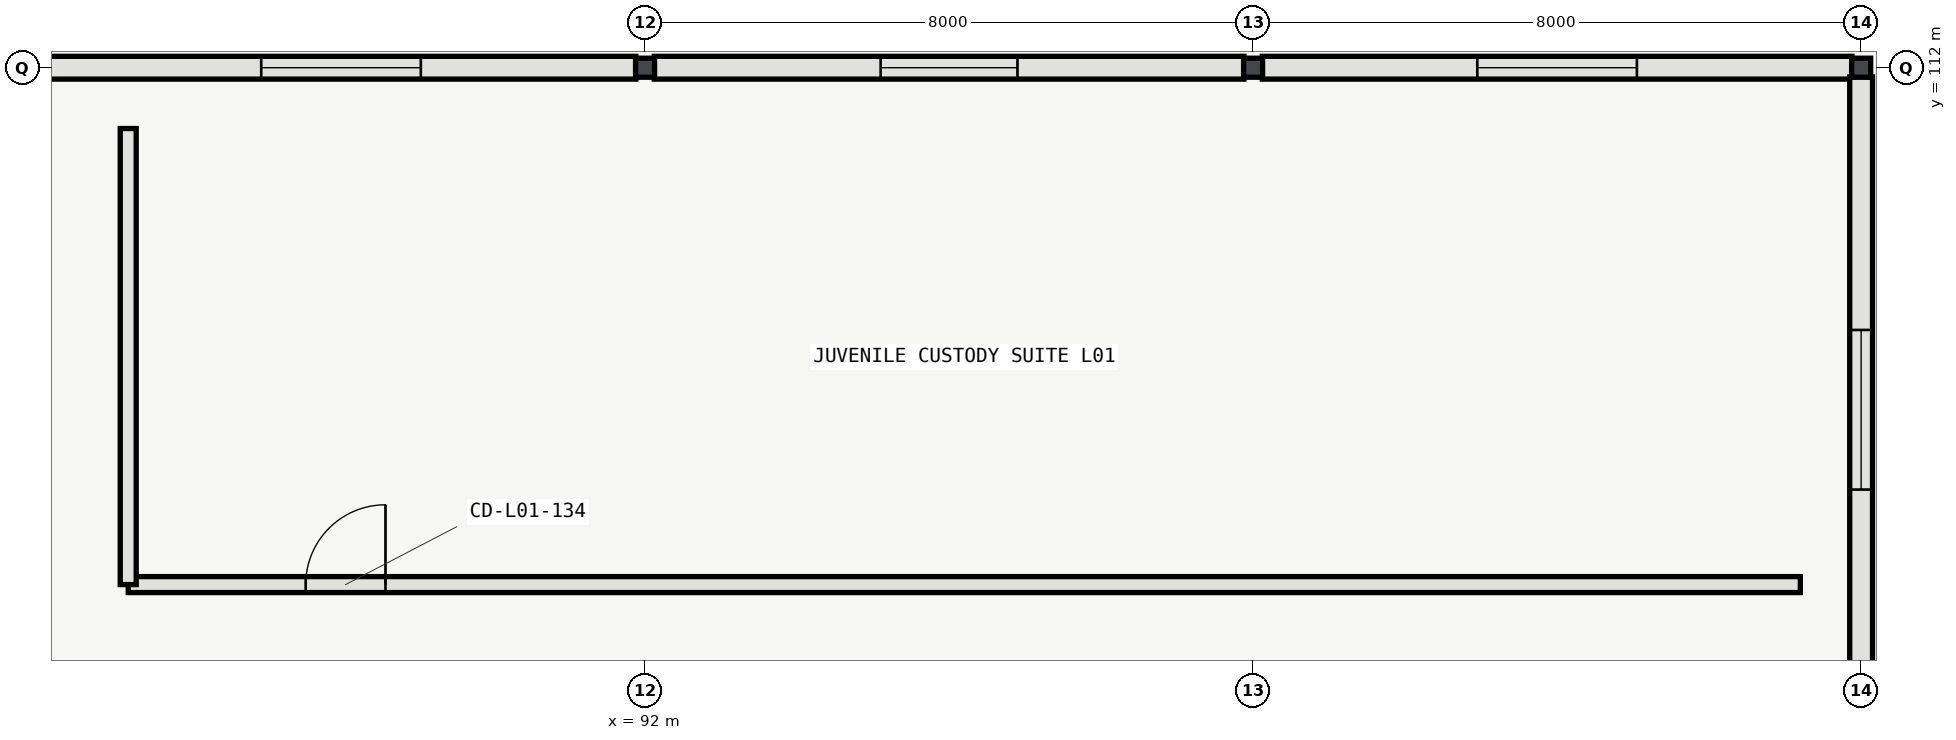
"""IFC4 building model, lengths in metres.
Left out: names, types, materials, properties, quantities, classifications, styles, units other than length and angle.
Written with IfcOpenShell. Run it as: python <this file> out.ifc"""

import sys

from ifc_helpers import new_model, si_unit, direction, frame, frame_2d, origin, origin_2d, place, context, subcontext, project, spatial, rectangle, i_section, extrude, element, fill, save


model = new_model("IFC4")
c1 = context("Model", 3, precision=1e-05, world=origin(), true_north=direction((0.0, 1.0)))
c2 = subcontext(c1, "Body", "Model", "MODEL_VIEW")
j1 = project(units=[si_unit("LENGTHUNIT", "METRE"), si_unit("PLANEANGLEUNIT", "RADIAN")], contexts=[c1])
p1 = place(None, origin())
s1 = spatial("IfcSite", under=j1, at=p1, CompositionType="ELEMENT")
p2 = place(p1, origin())
s2 = spatial("IfcBuilding", under=s1, at=p2, CompositionType="ELEMENT")
p3 = place(p2, frame((0.0, 0.0, 5.4)))
s3 = spatial("IfcBuildingStorey", under=s2, at=p3, CompositionType="ELEMENT", Elevation=5.4)
for number, where, z_axis, x_axis in (
    (1, (92.0, 112.0, 0.0), (0.0, 0.0, 1.0), (1.0, 0.0, 0.0)),
    (2, (100.0, 112.0, 0.0), (0.0, 0.0, 1.0), (1.0, 0.0, 0.0)),
    (3, (108.0, 112.0, 0.0), (0.0, 0.0, 1.0), (1.0, 0.0, 0.0)),
):
    element("IfcColumn", number, at=place(p3, frame(where, z_axis=z_axis, x_axis=x_axis)), inside=s3, PredefinedType="COLUMN", context=c2, shape_type="SweptSolid", body=[
        extrude(i_section(OverallWidth=0.25, OverallDepth=0.25, WebThickness=0.009, FlangeThickness=0.014, FilletRadius=0.016, at=origin_2d()), origin(), (0.0, 0.0, 1.0), 5.4),
    ])
p4 = place(p3, frame((91.879, 112.0, 0.0), z_axis=(0.0, 0.0, 1.0), x_axis=(-1.0, 0.0, 0.0)))
e4 = element("IfcWall", 4, at=p4, inside=s3, PredefinedType="SOLIDWALL", context=c2, shape_type="SweptSolid", body=[
    extrude(rectangle(XDim=7.758, YDim=0.3, at=frame_2d((3.879, 0.0))), origin(), (0.0, 0.0, 1.0), 4.823),
])
p5 = place(p4, frame((2.829, 0.0, 2.4)))
e5 = element("IfcOpeningElement", 5, at=p5, cuts=e4, PredefinedType="OPENING", context=c2, shape_type="SweptSolid", body=[
    extrude(rectangle(XDim=2.1, YDim=0.85, at=frame_2d((1.05, 0.425))), frame((0.0, 0.16, 0.0), z_axis=(0.0, -1.0, 0.0), x_axis=(1.0, 0.0, 0.0)), (0.0, 0.0, 1.0), 0.32),
])
p6 = place(p3, frame((99.879, 112.0, 0.0), z_axis=(0.0, 0.0, 1.0), x_axis=(-1.0, 0.0, 0.0)))
e6 = element("IfcWall", 6, at=p6, inside=s3, PredefinedType="SOLIDWALL", context=c2, shape_type="SweptSolid", body=[
    extrude(rectangle(XDim=7.758, YDim=0.3, at=frame_2d((3.879, 0.0))), origin(), (0.0, 0.0, 1.0), 4.823),
])
p7 = place(p6, frame((2.979, 0.0, 2.4)))
e7 = element("IfcOpeningElement", 7, at=p7, cuts=e6, PredefinedType="OPENING", context=c2, shape_type="SweptSolid", body=[
    extrude(rectangle(XDim=1.8, YDim=0.85, at=frame_2d((0.9, 0.425))), frame((0.0, 0.16, 0.0), z_axis=(0.0, -1.0, 0.0), x_axis=(1.0, 0.0, 0.0)), (0.0, 0.0, 1.0), 0.32),
])
p8 = place(p3, frame((107.879, 112.0, 0.0), z_axis=(0.0, 0.0, 1.0), x_axis=(-1.0, 0.0, 0.0)))
e8 = element("IfcWall", 8, at=p8, inside=s3, PredefinedType="SOLIDWALL", context=c2, shape_type="SweptSolid", body=[
    extrude(rectangle(XDim=7.758, YDim=0.3, at=frame_2d((3.879, 0.0))), origin(), (0.0, 0.0, 1.0), 4.823),
])
p9 = place(p8, frame((2.829, 0.0, 2.4)))
e9 = element("IfcOpeningElement", 9, at=p9, cuts=e8, PredefinedType="OPENING", context=c2, shape_type="SweptSolid", body=[
    extrude(rectangle(XDim=2.1, YDim=0.85, at=frame_2d((1.05, 0.425))), frame((0.0, 0.16, 0.0), z_axis=(0.0, -1.0, 0.0), x_axis=(1.0, 0.0, 0.0)), (0.0, 0.0, 1.0), 0.32),
])
p10 = place(p3, frame((108.0, 103.121, 0.0), z_axis=(0.0, 0.0, 1.0), x_axis=(0.0, 1.0, 0.0)))
e10 = element("IfcWall", 10, at=p10, inside=s3, PredefinedType="SOLIDWALL", context=c2, shape_type="SweptSolid", body=[
    extrude(rectangle(XDim=8.758, YDim=0.3, at=frame_2d((4.379, 0.0))), origin(), (0.0, 0.0, 1.0), 4.641),
])
p11 = place(p10, frame((3.329, 0.0, 2.4)))
e11 = element("IfcOpeningElement", 11, at=p11, cuts=e10, PredefinedType="OPENING", context=c2, shape_type="SweptSolid", body=[
    extrude(rectangle(XDim=2.1, YDim=0.85, at=frame_2d((1.05, 0.425))), frame((0.0, 0.16, 0.0), z_axis=(0.0, -1.0, 0.0), x_axis=(1.0, 0.0, 0.0)), (0.0, 0.0, 1.0), 0.32),
])
p12 = place(p3, frame((85.2, 105.2, 0.0), z_axis=(0.0, 0.0, 1.0), x_axis=(1.0, 0.0, 0.0)))
e12 = element("IfcWall", 12, at=p12, inside=s3, PredefinedType="PARTITIONING", context=c2, shape_type="SweptSolid", body=[
    extrude(rectangle(XDim=22.0, YDim=0.21, at=frame_2d((11.0, 0.0))), origin(), (0.0, 0.0, 1.0), 5.12),
])
p13 = place(p12, frame((2.335, 0.0, 0.0)))
e13 = element("IfcOpeningElement", 13, at=p13, cuts=e12, PredefinedType="OPENING", context=c2, shape_type="SweptSolid", body=[
    extrude(rectangle(XDim=1.05, YDim=2.15, at=frame_2d((0.525, 1.075))), frame((0.0, 0.115, 0.0), z_axis=(0.0, -1.0, 0.0), x_axis=(1.0, 0.0, 0.0)), (0.0, 0.0, 1.0), 0.23),
])
p14 = place(p3, frame((85.2, 111.2, 0.0), z_axis=(0.0, 0.0, 1.0), x_axis=(0.0, -1.0, 0.0)))
e14 = element("IfcWall", 14, at=p14, inside=s3, PredefinedType="PARTITIONING", context=c2, shape_type="SweptSolid", body=[
    extrude(rectangle(XDim=6.0, YDim=0.21, at=frame_2d((3.0, 0.0))), origin(), (0.0, 0.0, 1.0), 5.12),
])
p15 = place(p5, origin())
e15 = element("IfcWindow", 15, at=p15, inside=s3, PartitioningType="SINGLE_PANEL", PredefinedType="WINDOW", context=c2, shape_type="SweptSolid", body=[
    extrude(rectangle(XDim=2.1, YDim=0.85, at=frame_2d((1.05, 0.425))), frame((0.0, 0.03, 0.0), z_axis=(0.0, -1.0, 0.0), x_axis=(1.0, 0.0, 0.0)), (0.0, 0.0, 1.0), 0.06),
])
fill(e5, e15)
p16 = place(p7, origin())
e16 = element("IfcWindow", 16, at=p16, inside=s3, PartitioningType="SINGLE_PANEL", PredefinedType="WINDOW", context=c2, shape_type="SweptSolid", body=[
    extrude(rectangle(XDim=1.8, YDim=0.85, at=frame_2d((0.9, 0.425))), frame((0.0, 0.03, 0.0), z_axis=(0.0, -1.0, 0.0), x_axis=(1.0, 0.0, 0.0)), (0.0, 0.0, 1.0), 0.06),
])
fill(e7, e16)
p17 = place(p9, origin())
e17 = element("IfcWindow", 17, at=p17, inside=s3, PartitioningType="SINGLE_PANEL", PredefinedType="WINDOW", context=c2, shape_type="SweptSolid", body=[
    extrude(rectangle(XDim=2.1, YDim=0.85, at=frame_2d((1.05, 0.425))), frame((0.0, 0.03, 0.0), z_axis=(0.0, -1.0, 0.0), x_axis=(1.0, 0.0, 0.0)), (0.0, 0.0, 1.0), 0.06),
])
fill(e9, e17)
p18 = place(p11, origin())
e18 = element("IfcWindow", 18, at=p18, inside=s3, PartitioningType="SINGLE_PANEL", PredefinedType="WINDOW", context=c2, shape_type="SweptSolid", body=[
    extrude(rectangle(XDim=2.1, YDim=0.85, at=frame_2d((1.05, 0.425))), frame((0.0, 0.03, 0.0), z_axis=(0.0, -1.0, 0.0), x_axis=(1.0, 0.0, 0.0)), (0.0, 0.0, 1.0), 0.06),
])
fill(e11, e18)
p19 = place(p13, origin())
e19 = element("IfcDoor", 19, at=p19, inside=s3, OperationType="SINGLE_SWING_RIGHT", PredefinedType="DOOR", context=c2, shape_type="SweptSolid", body=[
    extrude(rectangle(XDim=1.05, YDim=2.15, at=frame_2d((0.525, 1.075))), frame((0.0, 0.025, 0.0), z_axis=(0.0, -1.0, 0.0), x_axis=(1.0, 0.0, 0.0)), (0.0, 0.0, 1.0), 0.05),
])
fill(e13, e19)
save(model, sys.argv[1])
